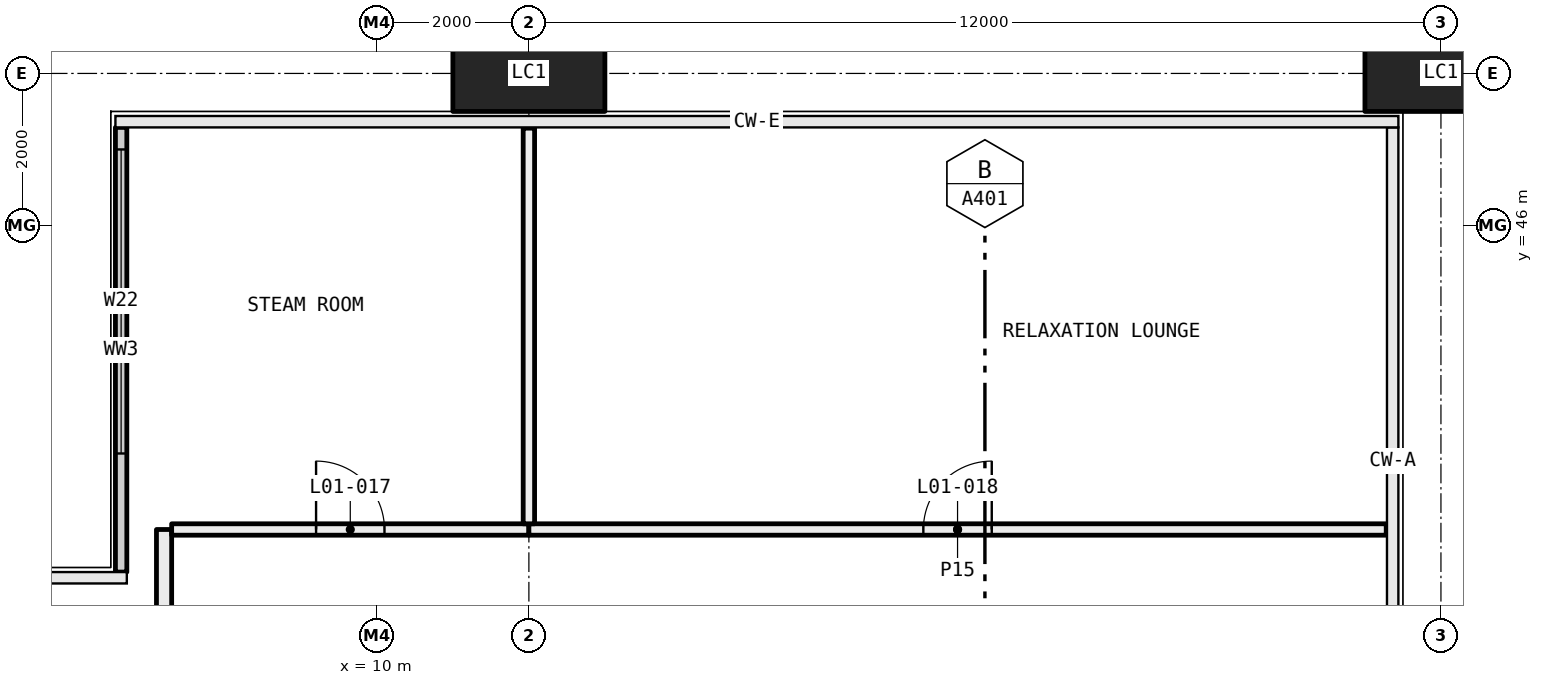
"""IFC4 building model, lengths in metres.
Left out: names, types, materials, properties, quantities, classifications, styles, units other than length and angle.
Written with IfcOpenShell. Run it as: python <this file> out.ifc"""

import sys

from ifc_helpers import new_model, si_unit, direction, frame, frame_2d, origin, origin_2d, place, context, subcontext, project, spatial, rectangle, hollow_rectangle, extrude, element, fill, save


model = new_model("IFC4")
c1 = context("Model", 3, precision=1e-05, world=origin(), true_north=direction((0.0, 1.0)))
c2 = subcontext(c1, "Body", "Model", "MODEL_VIEW")
j1 = project(units=[si_unit("LENGTHUNIT", "METRE"), si_unit("PLANEANGLEUNIT", "RADIAN")], contexts=[c1])
p1 = place(None, origin())
s1 = spatial("IfcSite", under=j1, at=p1, CompositionType="ELEMENT")
p2 = place(p1, origin())
s2 = spatial("IfcBuilding", under=s1, at=p2, CompositionType="ELEMENT")
p3 = place(p2, frame((0.0, 0.0, 6.0)))
s3 = spatial("IfcBuildingStorey", under=s2, at=p3, CompositionType="ELEMENT", Elevation=6.0)
for number, where, z_axis, x_axis in (
    (1, (12.0, 48.0, -0.4), (0.0, 0.0, 1.0), (1.0, 0.0, 0.0)),
    (2, (24.0, 48.0, -0.4), (0.0, 0.0, 1.0), (1.0, 0.0, 0.0)),
):
    element("IfcColumn", number, at=place(p3, frame(where, z_axis=z_axis, x_axis=x_axis)), inside=s3, PredefinedType="COLUMN", context=c2, shape_type="SweptSolid", body=[
        extrude(hollow_rectangle(XDim=2.0, YDim=1.0, WallThickness=0.08, at=origin_2d()), origin(), (0.0, 0.0, 1.0), 6.0),
    ])
p4 = place(p3, frame((6.635, 41.44, 0.0), z_axis=(0.0, 0.0, 1.0), x_axis=(0.0, 1.0, 0.0)))
e3 = element("IfcWall", 3, at=p4, inside=s3, PredefinedType="ELEMENTEDWALL", context=c2, shape_type="SweptSolid", body=[
    extrude(rectangle(XDim=5.85, YDim=0.15, at=frame_2d((2.925, 0.0))), origin(), (0.0, 0.0, 1.0), 5.6),
])
p5 = place(p4, frame((1.56, 0.0, 0.45)))
e4 = element("IfcOpeningElement", 4, at=p5, cuts=e3, PredefinedType="OPENING", context=c2, shape_type="SweptSolid", body=[
    extrude(rectangle(XDim=4.0, YDim=5.1, at=frame_2d((2.0, 2.55))), frame((0.0, 0.085, 0.0), z_axis=(0.0, -1.0, 0.0), x_axis=(1.0, 0.0, 0.0)), (0.0, 0.0, 1.0), 0.17),
])
p6 = place(p3, frame((7.2, 42.0, 0.0), z_axis=(0.0, 0.0, 1.0), x_axis=(0.0, -1.0, 0.0)))
e5 = element("IfcWall", 5, at=p6, inside=s3, PredefinedType="PARTITIONING", context=c2, shape_type="SweptSolid", body=[
    extrude(rectangle(XDim=6.0, YDim=0.2, at=frame_2d((3.0, 0.0))), origin(), (0.0, 0.0, 1.0), 5.0),
])
p7 = place(p6, frame((2.55, 0.0, 0.0)))
e6 = element("IfcOpeningElement", 6, at=p7, cuts=e5, PredefinedType="OPENING", context=c2, shape_type="SweptSolid", body=[
    extrude(rectangle(XDim=0.9, YDim=2.1, at=frame_2d((0.45, 1.05))), frame((0.0, 0.11, 0.0), z_axis=(0.0, -1.0, 0.0), x_axis=(1.0, 0.0, 0.0)), (0.0, 0.0, 1.0), 0.22),
])
p8 = place(p3, frame((12.0, 42.0, 0.0), z_axis=(0.0, 0.0, 1.0), x_axis=(-1.0, 0.0, 0.0)))
e7 = element("IfcWall", 7, at=p8, inside=s3, PredefinedType="PARTITIONING", context=c2, shape_type="SweptSolid", body=[
    extrude(rectangle(XDim=4.7, YDim=0.15, at=frame_2d((2.35, 0.0))), origin(), (0.0, 0.0, 1.0), 5.6),
])
p9 = place(p8, frame((1.9, 0.0, 0.0)))
e8 = element("IfcOpeningElement", 8, at=p9, cuts=e7, PredefinedType="OPENING", context=c2, shape_type="SweptSolid", body=[
    extrude(rectangle(XDim=0.9, YDim=2.1, at=frame_2d((0.45, 1.05))), frame((0.0, 0.085, 0.0), z_axis=(0.0, -1.0, 0.0), x_axis=(1.0, 0.0, 0.0)), (0.0, 0.0, 1.0), 0.17),
])
p10 = place(p3, frame((23.28, 42.0, 0.0), z_axis=(0.0, 0.0, 1.0), x_axis=(-1.0, 0.0, 0.0)))
e9 = element("IfcWall", 9, at=p10, inside=s3, PredefinedType="PARTITIONING", context=c2, shape_type="SweptSolid", body=[
    extrude(rectangle(XDim=11.28, YDim=0.15, at=frame_2d((5.64, 0.0))), origin(), (0.0, 0.0, 1.0), 5.6),
])
p11 = place(p10, frame((5.19, 0.0, 0.0)))
e10 = element("IfcOpeningElement", 10, at=p11, cuts=e9, PredefinedType="OPENING", context=c2, shape_type="SweptSolid", body=[
    extrude(rectangle(XDim=0.9, YDim=2.1, at=frame_2d((0.45, 1.05))), frame((0.0, 0.085, 0.0), z_axis=(0.0, -1.0, 0.0), x_axis=(1.0, 0.0, 0.0)), (0.0, 0.0, 1.0), 0.17),
])
p12 = place(p3, frame((12.0, 42.075, 0.0), z_axis=(0.0, 0.0, 1.0), x_axis=(0.0, 1.0, 0.0)))
e11 = element("IfcWall", 11, at=p12, inside=s3, PredefinedType="PARTITIONING", context=c2, shape_type="SweptSolid", body=[
    extrude(rectangle(XDim=5.205, YDim=0.15, at=frame_2d((2.603, 0.0))), origin(), (0.0, 0.0, 1.0), 5.6),
])
p13 = place(p5, origin())
e12 = element("IfcWindow", 12, at=p13, inside=s3, PartitioningType="SINGLE_PANEL", PredefinedType="WINDOW", context=c2, shape_type="SweptSolid", body=[
    extrude(rectangle(XDim=4.0, YDim=5.1, at=frame_2d((2.0, 2.55))), frame((0.0, 0.03, 0.0), z_axis=(0.0, -1.0, 0.0), x_axis=(1.0, 0.0, 0.0)), (0.0, 0.0, 1.0), 0.06),
])
fill(e4, e12)
p14 = place(p9, frame((0.9, 0.0, 0.0), x_axis=(-1.0, 0.0, 0.0)))
e13 = element("IfcDoor", 13, at=p14, inside=s3, OperationType="SINGLE_SWING_RIGHT", PredefinedType="DOOR", context=c2, shape_type="SweptSolid", body=[
    extrude(rectangle(XDim=0.9, YDim=2.1, at=frame_2d((0.45, 1.05))), frame((0.0, 0.025, 0.0), z_axis=(0.0, -1.0, 0.0), x_axis=(1.0, 0.0, 0.0)), (0.0, 0.0, 1.0), 0.05),
])
fill(e8, e13)
p15 = place(p11, frame((0.9, 0.0, 0.0), x_axis=(-1.0, 0.0, 0.0)))
e14 = element("IfcDoor", 14, at=p15, inside=s3, OperationType="SINGLE_SWING_LEFT", PredefinedType="DOOR", context=c2, shape_type="SweptSolid", body=[
    extrude(rectangle(XDim=0.9, YDim=2.1, at=frame_2d((0.45, 1.05))), frame((0.0, 0.025, 0.0), z_axis=(0.0, -1.0, 0.0), x_axis=(1.0, 0.0, 0.0)), (0.0, 0.0, 1.0), 0.05),
])
fill(e10, e14)
save(model, sys.argv[1])
